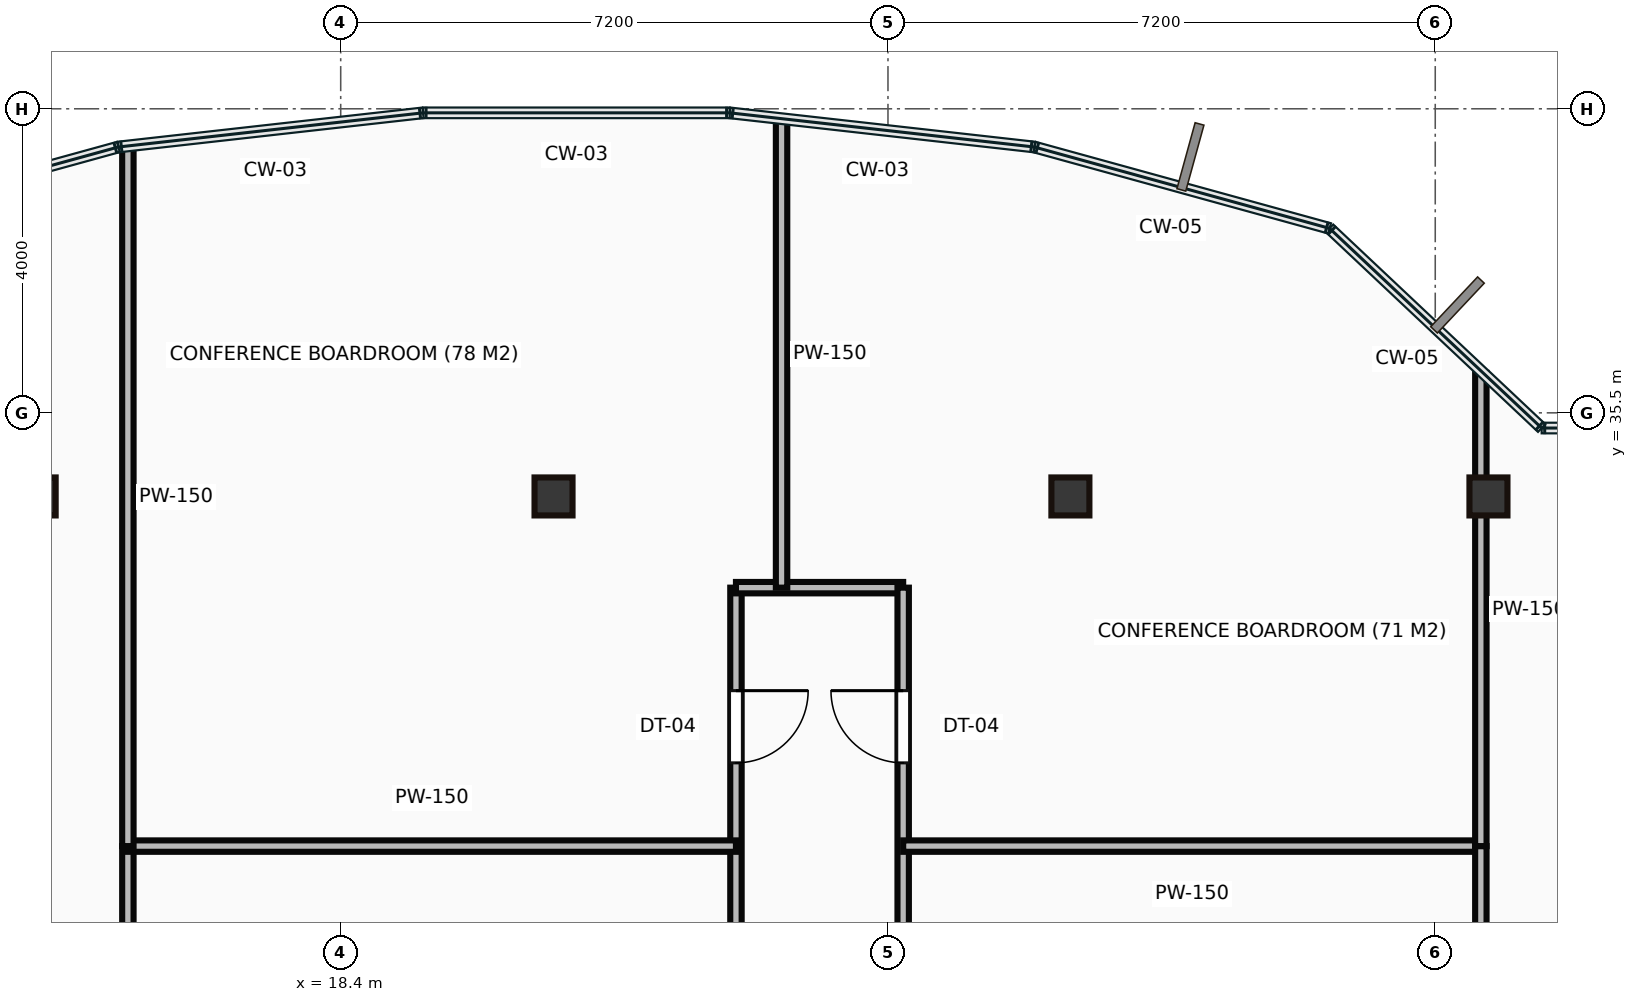
"""IFC4 building model, lengths in metres.
Left out: names, types, materials, properties, quantities, classifications, styles, units other than length and angle.
Written with IfcOpenShell. Run it as: python <this file> out.ifc"""

import sys

from ifc_helpers import new_model, si_unit, direction, frame, frame_2d, origin, origin_2d, place, context, subcontext, project, spatial, rectangle, hollow_rectangle, extrude, source, transform, mapped, element, fill, save


model = new_model("IFC4")
c1 = context("Model", 3, precision=1e-05, world=origin(), true_north=direction((0.0, 1.0)))
c2 = subcontext(c1, "Body", "Model", "MODEL_VIEW")
j1 = project(units=[si_unit("LENGTHUNIT", "METRE"), si_unit("PLANEANGLEUNIT", "RADIAN")], contexts=[c1])
p1 = place(None, origin())
s1 = spatial("IfcSite", under=j1, at=p1, CompositionType="ELEMENT")
p2 = place(p1, origin())
s2 = spatial("IfcBuilding", under=s1, at=p2, CompositionType="ELEMENT")
p3 = place(p2, frame((0.0, 0.0, 217.8)))
s3 = spatial("IfcBuildingStorey", under=s2, at=p3, CompositionType="ELEMENT", Elevation=217.8)
m1 = source(origin(), c2, "Body", "SweptSolid", [
    extrude(hollow_rectangle(XDim=0.5, YDim=0.5, WallThickness=0.022, at=origin_2d()), origin(), (0.0, 0.0, 1.0), 3.65),
])
for number, where, z_axis, x_axis in (
    (1, (14.4, 34.4, 0.0), (0.0, 0.0, 1.0), (1.0, 0.0, 0.0)),
    (2, (21.2, 34.4, 0.0), (0.0, 0.0, 1.0), (1.0, 0.0, 0.0)),
    (3, (28.0, 34.4, 0.0), (0.0, 0.0, 1.0), (1.0, 0.0, 0.0)),
    (4, (33.5, 34.4, 0.0), (0.0, 0.0, 1.0), (1.0, 0.0, 0.0)),
):
    element("IfcColumn", number, at=place(p3, frame(where, z_axis=z_axis, x_axis=x_axis)), inside=s3, PredefinedType="COLUMN", context=c2, shape_type="MappedRepresentation", body=[
        mapped(m1, transform((0.0, 0.0, 0.0))),
    ])
m2 = source(origin(), c2, "Body", "SweptSolid", [
    extrude(rectangle(XDim=13.35, YDim=0.15, at=frame_2d((6.675, 0.0))), origin(), (0.0, 0.0, 1.0), 3.4),
])
p4 = place(p3, frame((23.6, 19.85, 0.0), z_axis=(0.0, 0.0, 1.0), x_axis=(0.0, 1.0, 0.0)))
e5 = element("IfcWall", 5, at=p4, inside=s3, PredefinedType="PARTITIONING", context=c2, shape_type="MappedRepresentation", body=[
    mapped(m2, transform((0.0, 0.0, 0.0))),
])
p5 = place(p4, frame((5.475, 0.0, 0.0)))
e6 = element("IfcOpeningElement", 6, at=p5, cuts=e5, PredefinedType="OPENING", context=c2, shape_type="SweptSolid", body=[
    extrude(rectangle(XDim=0.95, YDim=2.15, at=frame_2d((0.475, 1.075))), frame((0.0, 0.085, 0.0), z_axis=(0.0, -1.0, 0.0), x_axis=(1.0, 0.0, 0.0)), (0.0, 0.0, 1.0), 0.17),
])
p6 = place(p4, frame((11.045, 0.0, 0.0)))
e7 = element("IfcOpeningElement", 7, at=p6, cuts=e5, PredefinedType="OPENING", context=c2, shape_type="SweptSolid", body=[
    extrude(rectangle(XDim=0.95, YDim=2.15, at=frame_2d((0.475, 1.075))), frame((0.0, 0.085, 0.0), z_axis=(0.0, -1.0, 0.0), x_axis=(1.0, 0.0, 0.0)), (0.0, 0.0, 1.0), 0.17),
])
m3 = source(origin(), c2, "Body", "SweptSolid", [
    extrude(rectangle(XDim=2.2, YDim=0.15, at=frame_2d((1.1, 0.0))), origin(), (0.0, 0.0, 1.0), 3.4),
])
p7 = place(p3, frame((23.6, 33.2, 0.0), z_axis=(0.0, 0.0, 1.0), x_axis=(1.0, 0.0, 0.0)))
e8 = element("IfcWall", 8, at=p7, inside=s3, PredefinedType="PARTITIONING", context=c2, shape_type="MappedRepresentation", body=[
    mapped(m3, transform((0.0, 0.0, 0.0))),
])
p8 = place(p3, frame((25.8, 33.2, 0.0), z_axis=(0.0, 0.0, 1.0), x_axis=(0.0, -1.0, 0.0)))
e9 = element("IfcWall", 9, at=p8, inside=s3, PredefinedType="PARTITIONING", context=c2, shape_type="MappedRepresentation", body=[
    mapped(m2, transform((0.0, 0.0, 0.0))),
])
p9 = place(p8, frame((1.355, 0.0, 0.0)))
e10 = element("IfcOpeningElement", 10, at=p9, cuts=e9, PredefinedType="OPENING", context=c2, shape_type="SweptSolid", body=[
    extrude(rectangle(XDim=0.95, YDim=2.15, at=frame_2d((0.475, 1.075))), frame((0.0, 0.085, 0.0), z_axis=(0.0, -1.0, 0.0), x_axis=(1.0, 0.0, 0.0)), (0.0, 0.0, 1.0), 0.17),
])
p10 = place(p8, frame((7.77, 0.0, 0.0)))
e11 = element("IfcOpeningElement", 11, at=p10, cuts=e9, PredefinedType="OPENING", context=c2, shape_type="SweptSolid", body=[
    extrude(rectangle(XDim=0.95, YDim=2.15, at=frame_2d((0.475, 1.075))), frame((0.0, 0.085, 0.0), z_axis=(0.0, -1.0, 0.0), x_axis=(1.0, 0.0, 0.0)), (0.0, 0.0, 1.0), 0.17),
])
m4 = source(origin(), c2, "Body", "SweptSolid", [
    extrude(rectangle(XDim=8.0, YDim=0.15, at=frame_2d((4.0, 0.0))), origin(), (0.0, 0.0, 1.0), 3.4),
])
for number, where, z_axis, x_axis in (
    (12, (15.6, 29.8, 0.0), (0.0, 0.0, 1.0), (0.0, -1.0, 0.0)),
    (13, (15.6, 29.8, 0.0), (0.0, 0.0, 1.0), (1.0, 0.0, 0.0)),
):
    element("IfcWall", number, at=place(p3, frame(where, z_axis=z_axis, x_axis=x_axis)), inside=s3, PredefinedType="PARTITIONING", context=c2, shape_type="MappedRepresentation", body=[
        mapped(m4, transform((0.0, 0.0, 0.0))),
    ])
m5 = source(origin(), c2, "Body", "SweptSolid", [
    extrude(rectangle(XDim=9.191, YDim=0.15, at=frame_2d((4.596, 0.0))), origin(), (0.0, 0.0, 1.0), 3.4),
])
p11 = place(p3, frame((15.6, 38.991, 0.0), z_axis=(0.0, 0.0, 1.0), x_axis=(0.0, -1.0, 0.0)))
e14 = element("IfcWall", 14, at=p11, inside=s3, PredefinedType="PARTITIONING", context=c2, shape_type="MappedRepresentation", body=[
    mapped(m5, transform((0.0, 0.0, 0.0))),
])
m6 = source(origin(), c2, "Body", "SweptSolid", [
    extrude(rectangle(XDim=6.15, YDim=0.15, at=frame_2d((3.075, 0.0))), origin(), (0.0, 0.0, 1.0), 3.4),
])
p12 = place(p3, frame((24.2, 39.35, 0.0), z_axis=(0.0, 0.0, 1.0), x_axis=(0.0, -1.0, 0.0)))
e15 = element("IfcWall", 15, at=p12, inside=s3, PredefinedType="PARTITIONING", context=c2, shape_type="MappedRepresentation", body=[
    mapped(m6, transform((0.0, 0.0, 0.0))),
])
m7 = source(origin(), c2, "Body", "SweptSolid", [
    extrude(rectangle(XDim=7.6, YDim=0.15, at=frame_2d((3.8, 0.0))), origin(), (0.0, 0.0, 1.0), 3.4),
])
p13 = place(p3, frame((33.4, 29.8, 0.0), z_axis=(0.0, 0.0, 1.0), x_axis=(-1.0, 0.0, 0.0)))
e16 = element("IfcWall", 16, at=p13, inside=s3, PredefinedType="PARTITIONING", context=c2, shape_type="MappedRepresentation", body=[
    mapped(m7, transform((0.0, 0.0, 0.0))),
])
m8 = source(origin(), c2, "Body", "SweptSolid", [
    extrude(rectangle(XDim=8.0, YDim=0.15, at=frame_2d((4.0, 0.0))), origin(), (0.0, 0.0, 1.0), 2.787),
])
p14 = place(p3, frame((33.4, 29.8, 0.0), z_axis=(0.0, 0.0, 1.0), x_axis=(0.0, -1.0, 0.0)))
e17 = element("IfcWall", 17, at=p14, inside=s3, PredefinedType="PARTITIONING", context=c2, shape_type="MappedRepresentation", body=[
    mapped(m8, transform((0.0, 0.0, 0.0))),
])
m9 = source(origin(), c2, "Body", "SweptSolid", [
    extrude(rectangle(XDim=6.226, YDim=0.15, at=frame_2d((3.113, 0.0))), origin(), (0.0, 0.0, 1.0), 2.787),
])
p15 = place(p3, frame((33.4, 36.026, 0.0), z_axis=(0.0, 0.0, 1.0), x_axis=(0.0, -1.0, 0.0)))
e18 = element("IfcWall", 18, at=p15, inside=s3, PredefinedType="PARTITIONING", context=c2, shape_type="MappedRepresentation", body=[
    mapped(m9, transform((0.0, 0.0, 0.0))),
])
m10 = source(origin(), c2, "Body", "SweptSolid", [
    extrude(rectangle(XDim=0.95, YDim=2.15, at=frame_2d((0.475, 1.075))), frame((0.0, 0.025, 0.0), z_axis=(0.0, -1.0, 0.0), x_axis=(1.0, 0.0, 0.0)), (0.0, 0.0, 1.0), 0.05),
])
p16 = place(p6, origin())
e19 = element("IfcDoor", 19, at=p16, inside=s3, OperationType="SINGLE_SWING_RIGHT", PredefinedType="DOOR", context=c2, shape_type="MappedRepresentation", body=[
    mapped(m10, transform((0.0, 0.0, 0.0))),
])
fill(e7, e19)
p17 = place(p9, origin())
e20 = element("IfcDoor", 20, at=p17, inside=s3, OperationType="SINGLE_SWING_LEFT", PredefinedType="DOOR", context=c2, shape_type="MappedRepresentation", body=[
    mapped(m10, transform((0.0, 0.0, 0.0))),
])
fill(e10, e20)
save(model, sys.argv[1])
